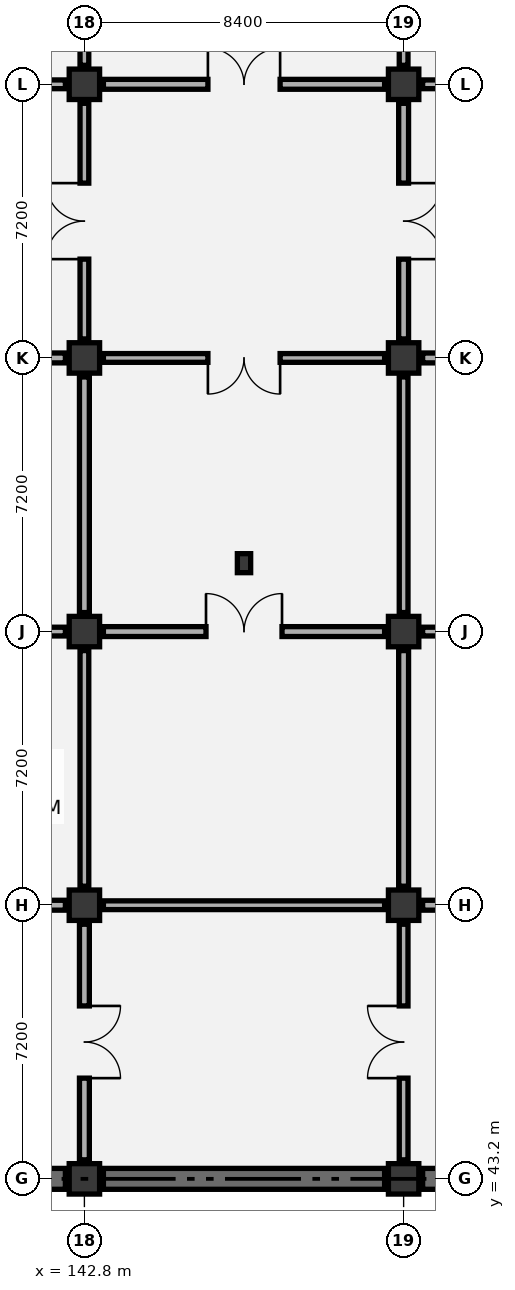
"""IFC4 building model, lengths in metres.
Left out: names, types, materials, properties, quantities, classifications, styles, units other than length and angle.
Written with IfcOpenShell. Run it as: python <this file> out.ifc"""

import sys

from ifc_helpers import new_model, si_unit, direction, frame, frame_2d, origin, origin_2d, place, context, subcontext, project, spatial, rectangle, extrude, element, fill, save


model = new_model("IFC4")
c1 = context("Model", 3, precision=1e-05, world=origin(), true_north=direction((0.0, 1.0)))
c2 = subcontext(c1, "Body", "Model", "MODEL_VIEW")
j1 = project(units=[si_unit("LENGTHUNIT", "METRE"), si_unit("PLANEANGLEUNIT", "RADIAN")], contexts=[c1])
p1 = place(None, origin())
s1 = spatial("IfcSite", under=j1, at=p1, CompositionType="ELEMENT")
p2 = place(p1, origin())
s2 = spatial("IfcBuilding", under=s1, at=p2, CompositionType="ELEMENT")
p3 = place(p2, frame((0.0, 0.0, -9.6)))
s3 = spatial("IfcBuildingStorey", under=s2, at=p3, CompositionType="ELEMENT", Elevation=-9.6)
for number, where, z_axis, x_axis in (
    (1, (142.8, 43.2, 0.0), (0.0, 0.0, 1.0), (1.0, 0.0, 0.0)),
    (2, (142.8, 50.4, 0.0), (0.0, 0.0, 1.0), (1.0, 0.0, 0.0)),
    (3, (142.8, 57.6, 0.0), (0.0, 0.0, 1.0), (1.0, 0.0, 0.0)),
    (4, (142.8, 64.8, 0.0), (0.0, 0.0, 1.0), (1.0, 0.0, 0.0)),
    (5, (142.8, 72.0, 0.0), (0.0, 0.0, 1.0), (1.0, 0.0, 0.0)),
    (6, (151.2, 43.2, 0.0), (0.0, 0.0, 1.0), (1.0, 0.0, 0.0)),
    (7, (151.2, 50.4, 0.0), (0.0, 0.0, 1.0), (1.0, 0.0, 0.0)),
    (8, (151.2, 57.6, 0.0), (0.0, 0.0, 1.0), (1.0, 0.0, 0.0)),
    (9, (151.2, 64.8, 0.0), (0.0, 0.0, 1.0), (1.0, 0.0, 0.0)),
    (10, (151.2, 72.0, 0.0), (0.0, 0.0, 1.0), (1.0, 0.0, 0.0)),
):
    element("IfcColumn", number, at=place(p3, frame(where, z_axis=z_axis, x_axis=x_axis)), inside=s3, PredefinedType="COLUMN", context=c2, shape_type="SweptSolid", body=[
        extrude(rectangle(XDim=0.8, YDim=0.8, at=origin_2d()), origin(), (0.0, 0.0, 1.0), 4.8),
    ])
p4 = place(p3, frame((147.0, 59.4, 0.0), z_axis=(0.0, 0.0, 1.0), x_axis=(1.0, 0.0, 0.0)))
e11 = element("IfcColumn", 11, at=p4, inside=s3, PredefinedType="PILASTER", context=c2, shape_type="SweptSolid", body=[
    extrude(rectangle(XDim=0.35, YDim=0.5, at=origin_2d()), origin(), (0.0, 0.0, 1.0), 4.8),
])
p5 = place(p3, frame((134.9, 43.2, 0.0), z_axis=(0.0, 0.0, 1.0), x_axis=(1.0, 0.0, 0.0)))
e12 = element("IfcWall", 12, at=p5, inside=s3, PredefinedType="USERDEFINED", context=c2, shape_type="SweptSolid", body=[
    extrude(rectangle(XDim=7.4, YDim=0.55, at=frame_2d((3.7, 0.0))), origin(), (0.0, 0.0, 1.0), 4.4),
])
p6 = place(p3, frame((143.3, 43.2, 0.0), z_axis=(0.0, 0.0, 1.0), x_axis=(1.0, 0.0, 0.0)))
e13 = element("IfcWall", 13, at=p6, inside=s3, PredefinedType="USERDEFINED", context=c2, shape_type="SweptSolid", body=[
    extrude(rectangle(XDim=7.4, YDim=0.55, at=frame_2d((3.7, 0.0))), origin(), (0.0, 0.0, 1.0), 4.4),
])
p7 = place(p3, frame((151.7, 43.2, 0.0), z_axis=(0.0, 0.0, 1.0), x_axis=(1.0, 0.0, 0.0)))
e14 = element("IfcWall", 14, at=p7, inside=s3, PredefinedType="USERDEFINED", context=c2, shape_type="SweptSolid", body=[
    extrude(rectangle(XDim=7.4, YDim=0.55, at=frame_2d((3.7, 0.0))), origin(), (0.0, 0.0, 1.0), 4.4),
])
p8 = place(p3, frame((142.8, 43.7, 0.0), z_axis=(0.0, 0.0, 1.0), x_axis=(0.0, 1.0, 0.0)))
e15 = element("IfcWall", 15, at=p8, inside=s3, PredefinedType="PARTITIONING", context=c2, shape_type="SweptSolid", body=[
    extrude(rectangle(XDim=6.2, YDim=0.26, at=frame_2d((3.1, 0.0))), origin(), (0.0, 0.0, 1.0), 3.595),
])
p9 = place(p8, frame((2.15, 0.0, 0.0)))
e16 = element("IfcOpeningElement", 16, at=p9, cuts=e15, PredefinedType="OPENING", context=c2, shape_type="SweptSolid", body=[
    extrude(rectangle(XDim=1.9, YDim=2.3, at=frame_2d((0.95, 1.15))), frame((0.0, 0.14, 0.0), z_axis=(0.0, -1.0, 0.0), x_axis=(1.0, 0.0, 0.0)), (0.0, 0.0, 1.0), 0.28),
])
p10 = place(p3, frame((134.9, 50.4, 0.0), z_axis=(0.0, 0.0, 1.0), x_axis=(1.0, 0.0, 0.0)))
e17 = element("IfcWall", 17, at=p10, inside=s3, PredefinedType="PARTITIONING", context=c2, shape_type="SweptSolid", body=[
    extrude(rectangle(XDim=7.4, YDim=0.26, at=frame_2d((3.7, 0.0))), origin(), (0.0, 0.0, 1.0), 3.495),
])
p11 = place(p3, frame((142.8, 50.9, 0.0), z_axis=(0.0, 0.0, 1.0), x_axis=(0.0, 1.0, 0.0)))
e18 = element("IfcWall", 18, at=p11, inside=s3, PredefinedType="PARTITIONING", context=c2, shape_type="SweptSolid", body=[
    extrude(rectangle(XDim=6.2, YDim=0.23, at=frame_2d((3.1, 0.0))), origin(), (0.0, 0.0, 1.0), 3.595),
])
p12 = place(p3, frame((134.9, 57.6, 0.0), z_axis=(0.0, 0.0, 1.0), x_axis=(1.0, 0.0, 0.0)))
e19 = element("IfcWall", 19, at=p12, inside=s3, PredefinedType="PARTITIONING", context=c2, shape_type="SweptSolid", body=[
    extrude(rectangle(XDim=7.4, YDim=0.23, at=frame_2d((3.7, 0.0))), origin(), (0.0, 0.0, 1.0), 3.495),
])
p13 = place(p12, frame((2.7, 0.0, 0.0)))
e20 = element("IfcOpeningElement", 20, at=p13, cuts=e19, PredefinedType="OPENING", context=c2, shape_type="SweptSolid", body=[
    extrude(rectangle(XDim=2.0, YDim=2.35, at=frame_2d((1.0, 1.175))), frame((0.0, 0.125, 0.0), z_axis=(0.0, -1.0, 0.0), x_axis=(1.0, 0.0, 0.0)), (0.0, 0.0, 1.0), 0.25),
])
p14 = place(p3, frame((142.8, 58.1, 0.0), z_axis=(0.0, 0.0, 1.0), x_axis=(0.0, 1.0, 0.0)))
e21 = element("IfcWall", 21, at=p14, inside=s3, PredefinedType="PARTITIONING", context=c2, shape_type="SweptSolid", body=[
    extrude(rectangle(XDim=6.2, YDim=0.26, at=frame_2d((3.1, 0.0))), origin(), (0.0, 0.0, 1.0), 3.595),
])
p15 = place(p3, frame((134.9, 64.8, 0.0), z_axis=(0.0, 0.0, 1.0), x_axis=(1.0, 0.0, 0.0)))
e22 = element("IfcWall", 22, at=p15, inside=s3, PredefinedType="PARTITIONING", context=c2, shape_type="SweptSolid", body=[
    extrude(rectangle(XDim=7.4, YDim=0.26, at=frame_2d((3.7, 0.0))), origin(), (0.0, 0.0, 1.0), 3.495),
])
p16 = place(p15, frame((2.75, 0.0, 0.0)))
e23 = element("IfcOpeningElement", 23, at=p16, cuts=e22, PredefinedType="OPENING", context=c2, shape_type="SweptSolid", body=[
    extrude(rectangle(XDim=1.9, YDim=2.3, at=frame_2d((0.95, 1.15))), frame((0.0, 0.14, 0.0), z_axis=(0.0, -1.0, 0.0), x_axis=(1.0, 0.0, 0.0)), (0.0, 0.0, 1.0), 0.28),
])
p17 = place(p3, frame((142.8, 65.3, 0.0), z_axis=(0.0, 0.0, 1.0), x_axis=(0.0, 1.0, 0.0)))
e24 = element("IfcWall", 24, at=p17, inside=s3, PredefinedType="PARTITIONING", context=c2, shape_type="SweptSolid", body=[
    extrude(rectangle(XDim=6.2, YDim=0.23, at=frame_2d((3.1, 0.0))), origin(), (0.0, 0.0, 1.0), 3.595),
])
p18 = place(p17, frame((2.1, 0.0, 0.0)))
e25 = element("IfcOpeningElement", 25, at=p18, cuts=e24, PredefinedType="OPENING", context=c2, shape_type="SweptSolid", body=[
    extrude(rectangle(XDim=2.0, YDim=2.35, at=frame_2d((1.0, 1.175))), frame((0.0, 0.125, 0.0), z_axis=(0.0, -1.0, 0.0), x_axis=(1.0, 0.0, 0.0)), (0.0, 0.0, 1.0), 0.25),
])
p19 = place(p3, frame((134.9, 72.0, 0.0), z_axis=(0.0, 0.0, 1.0), x_axis=(1.0, 0.0, 0.0)))
e26 = element("IfcWall", 26, at=p19, inside=s3, PredefinedType="PARTITIONING", context=c2, shape_type="SweptSolid", body=[
    extrude(rectangle(XDim=7.4, YDim=0.23, at=frame_2d((3.7, 0.0))), origin(), (0.0, 0.0, 1.0), 3.495),
])
p20 = place(p19, frame((2.95, 0.0, 0.0)))
e27 = element("IfcOpeningElement", 27, at=p20, cuts=e26, PredefinedType="OPENING", context=c2, shape_type="SweptSolid", body=[
    extrude(rectangle(XDim=1.5, YDim=2.15, at=frame_2d((0.75, 1.075))), frame((0.0, 0.125, 0.0), z_axis=(0.0, -1.0, 0.0), x_axis=(1.0, 0.0, 0.0)), (0.0, 0.0, 1.0), 0.25),
])
p21 = place(p3, frame((142.8, 72.5, 0.0), z_axis=(0.0, 0.0, 1.0), x_axis=(0.0, 1.0, 0.0)))
e28 = element("IfcWall", 28, at=p21, inside=s3, PredefinedType="PARTITIONING", context=c2, shape_type="SweptSolid", body=[
    extrude(rectangle(XDim=6.2, YDim=0.23, at=frame_2d((3.1, 0.0))), origin(), (0.0, 0.0, 1.0), 3.595),
])
p22 = place(p3, frame((151.2, 43.7, 0.0), z_axis=(0.0, 0.0, 1.0), x_axis=(0.0, 1.0, 0.0)))
e29 = element("IfcWall", 29, at=p22, inside=s3, PredefinedType="PARTITIONING", context=c2, shape_type="SweptSolid", body=[
    extrude(rectangle(XDim=6.2, YDim=0.23, at=frame_2d((3.1, 0.0))), origin(), (0.0, 0.0, 1.0), 3.595),
])
p23 = place(p22, frame((2.15, 0.0, 0.0)))
e30 = element("IfcOpeningElement", 30, at=p23, cuts=e29, PredefinedType="OPENING", context=c2, shape_type="SweptSolid", body=[
    extrude(rectangle(XDim=1.9, YDim=2.3, at=frame_2d((0.95, 1.15))), frame((0.0, 0.125, 0.0), z_axis=(0.0, -1.0, 0.0), x_axis=(1.0, 0.0, 0.0)), (0.0, 0.0, 1.0), 0.25),
])
p24 = place(p3, frame((143.3, 50.4, 0.0), z_axis=(0.0, 0.0, 1.0), x_axis=(1.0, 0.0, 0.0)))
e31 = element("IfcWall", 31, at=p24, inside=s3, PredefinedType="PARTITIONING", context=c2, shape_type="SweptSolid", body=[
    extrude(rectangle(XDim=7.4, YDim=0.23, at=frame_2d((3.7, 0.0))), origin(), (0.0, 0.0, 1.0), 3.495),
])
p25 = place(p3, frame((151.2, 50.9, 0.0), z_axis=(0.0, 0.0, 1.0), x_axis=(0.0, 1.0, 0.0)))
e32 = element("IfcWall", 32, at=p25, inside=s3, PredefinedType="PARTITIONING", context=c2, shape_type="SweptSolid", body=[
    extrude(rectangle(XDim=6.2, YDim=0.26, at=frame_2d((3.1, 0.0))), origin(), (0.0, 0.0, 1.0), 3.595),
])
p26 = place(p3, frame((143.3, 57.6, 0.0), z_axis=(0.0, 0.0, 1.0), x_axis=(1.0, 0.0, 0.0)))
e33 = element("IfcWall", 33, at=p26, inside=s3, PredefinedType="PARTITIONING", context=c2, shape_type="SweptSolid", body=[
    extrude(rectangle(XDim=7.4, YDim=0.26, at=frame_2d((3.7, 0.0))), origin(), (0.0, 0.0, 1.0), 3.495),
])
p27 = place(p26, frame((2.7, 0.0, 0.0)))
e34 = element("IfcOpeningElement", 34, at=p27, cuts=e33, PredefinedType="OPENING", context=c2, shape_type="SweptSolid", body=[
    extrude(rectangle(XDim=2.0, YDim=2.35, at=frame_2d((1.0, 1.175))), frame((0.0, 0.14, 0.0), z_axis=(0.0, -1.0, 0.0), x_axis=(1.0, 0.0, 0.0)), (0.0, 0.0, 1.0), 0.28),
])
p28 = place(p3, frame((151.2, 58.1, 0.0), z_axis=(0.0, 0.0, 1.0), x_axis=(0.0, 1.0, 0.0)))
e35 = element("IfcWall", 35, at=p28, inside=s3, PredefinedType="PARTITIONING", context=c2, shape_type="SweptSolid", body=[
    extrude(rectangle(XDim=6.2, YDim=0.23, at=frame_2d((3.1, 0.0))), origin(), (0.0, 0.0, 1.0), 3.595),
])
p29 = place(p3, frame((143.3, 64.8, 0.0), z_axis=(0.0, 0.0, 1.0), x_axis=(1.0, 0.0, 0.0)))
e36 = element("IfcWall", 36, at=p29, inside=s3, PredefinedType="PARTITIONING", context=c2, shape_type="SweptSolid", body=[
    extrude(rectangle(XDim=7.4, YDim=0.23, at=frame_2d((3.7, 0.0))), origin(), (0.0, 0.0, 1.0), 3.495),
])
p30 = place(p29, frame((2.75, 0.0, 0.0)))
e37 = element("IfcOpeningElement", 37, at=p30, cuts=e36, PredefinedType="OPENING", context=c2, shape_type="SweptSolid", body=[
    extrude(rectangle(XDim=1.9, YDim=2.3, at=frame_2d((0.95, 1.15))), frame((0.0, 0.125, 0.0), z_axis=(0.0, -1.0, 0.0), x_axis=(1.0, 0.0, 0.0)), (0.0, 0.0, 1.0), 0.25),
])
p31 = place(p3, frame((151.2, 65.3, 0.0), z_axis=(0.0, 0.0, 1.0), x_axis=(0.0, 1.0, 0.0)))
e38 = element("IfcWall", 38, at=p31, inside=s3, PredefinedType="PARTITIONING", context=c2, shape_type="SweptSolid", body=[
    extrude(rectangle(XDim=6.2, YDim=0.26, at=frame_2d((3.1, 0.0))), origin(), (0.0, 0.0, 1.0), 3.595),
])
p32 = place(p31, frame((2.1, 0.0, 0.0)))
e39 = element("IfcOpeningElement", 39, at=p32, cuts=e38, PredefinedType="OPENING", context=c2, shape_type="SweptSolid", body=[
    extrude(rectangle(XDim=2.0, YDim=2.35, at=frame_2d((1.0, 1.175))), frame((0.0, 0.14, 0.0), z_axis=(0.0, -1.0, 0.0), x_axis=(1.0, 0.0, 0.0)), (0.0, 0.0, 1.0), 0.28),
])
p33 = place(p3, frame((143.3, 72.0, 0.0), z_axis=(0.0, 0.0, 1.0), x_axis=(1.0, 0.0, 0.0)))
e40 = element("IfcWall", 40, at=p33, inside=s3, PredefinedType="PARTITIONING", context=c2, shape_type="SweptSolid", body=[
    extrude(rectangle(XDim=7.4, YDim=0.26, at=frame_2d((3.7, 0.0))), origin(), (0.0, 0.0, 1.0), 3.495),
])
p34 = place(p33, frame((2.75, 0.0, 0.0)))
e41 = element("IfcOpeningElement", 41, at=p34, cuts=e40, PredefinedType="OPENING", context=c2, shape_type="SweptSolid", body=[
    extrude(rectangle(XDim=1.9, YDim=2.3, at=frame_2d((0.95, 1.15))), frame((0.0, 0.14, 0.0), z_axis=(0.0, -1.0, 0.0), x_axis=(1.0, 0.0, 0.0)), (0.0, 0.0, 1.0), 0.28),
])
p35 = place(p3, frame((151.2, 72.5, 0.0), z_axis=(0.0, 0.0, 1.0), x_axis=(0.0, 1.0, 0.0)))
e42 = element("IfcWall", 42, at=p35, inside=s3, PredefinedType="PARTITIONING", context=c2, shape_type="SweptSolid", body=[
    extrude(rectangle(XDim=6.2, YDim=0.23, at=frame_2d((3.1, 0.0))), origin(), (0.0, 0.0, 1.0), 3.595),
])
p36 = place(p3, frame((151.7, 50.4, 0.0), z_axis=(0.0, 0.0, 1.0), x_axis=(1.0, 0.0, 0.0)))
e43 = element("IfcWall", 43, at=p36, inside=s3, PredefinedType="PARTITIONING", context=c2, shape_type="SweptSolid", body=[
    extrude(rectangle(XDim=7.4, YDim=0.26, at=frame_2d((3.7, 0.0))), origin(), (0.0, 0.0, 1.0), 3.495),
])
p37 = place(p3, frame((151.7, 57.6, 0.0), z_axis=(0.0, 0.0, 1.0), x_axis=(1.0, 0.0, 0.0)))
e44 = element("IfcWall", 44, at=p37, inside=s3, PredefinedType="PARTITIONING", context=c2, shape_type="SweptSolid", body=[
    extrude(rectangle(XDim=7.4, YDim=0.23, at=frame_2d((3.7, 0.0))), origin(), (0.0, 0.0, 1.0), 3.495),
])
p38 = place(p37, frame((2.7, 0.0, 0.0)))
e45 = element("IfcOpeningElement", 45, at=p38, cuts=e44, PredefinedType="OPENING", context=c2, shape_type="SweptSolid", body=[
    extrude(rectangle(XDim=2.0, YDim=2.35, at=frame_2d((1.0, 1.175))), frame((0.0, 0.125, 0.0), z_axis=(0.0, -1.0, 0.0), x_axis=(1.0, 0.0, 0.0)), (0.0, 0.0, 1.0), 0.25),
])
p39 = place(p3, frame((151.7, 64.8, 0.0), z_axis=(0.0, 0.0, 1.0), x_axis=(1.0, 0.0, 0.0)))
e46 = element("IfcWall", 46, at=p39, inside=s3, PredefinedType="PARTITIONING", context=c2, shape_type="SweptSolid", body=[
    extrude(rectangle(XDim=7.4, YDim=0.26, at=frame_2d((3.7, 0.0))), origin(), (0.0, 0.0, 1.0), 3.495),
])
p40 = place(p39, frame((2.75, 0.0, 0.0)))
e47 = element("IfcOpeningElement", 47, at=p40, cuts=e46, PredefinedType="OPENING", context=c2, shape_type="SweptSolid", body=[
    extrude(rectangle(XDim=1.9, YDim=2.3, at=frame_2d((0.95, 1.15))), frame((0.0, 0.14, 0.0), z_axis=(0.0, -1.0, 0.0), x_axis=(1.0, 0.0, 0.0)), (0.0, 0.0, 1.0), 0.28),
])
p41 = place(p3, frame((151.7, 72.0, 0.0), z_axis=(0.0, 0.0, 1.0), x_axis=(1.0, 0.0, 0.0)))
e48 = element("IfcWall", 48, at=p41, inside=s3, PredefinedType="PARTITIONING", context=c2, shape_type="SweptSolid", body=[
    extrude(rectangle(XDim=7.4, YDim=0.23, at=frame_2d((3.7, 0.0))), origin(), (0.0, 0.0, 1.0), 3.495),
])
p42 = place(p41, frame((2.75, 0.0, 0.0)))
e49 = element("IfcOpeningElement", 49, at=p42, cuts=e48, PredefinedType="OPENING", context=c2, shape_type="SweptSolid", body=[
    extrude(rectangle(XDim=1.9, YDim=2.3, at=frame_2d((0.95, 1.15))), frame((0.0, 0.125, 0.0), z_axis=(0.0, -1.0, 0.0), x_axis=(1.0, 0.0, 0.0)), (0.0, 0.0, 1.0), 0.25),
])
p43 = place(p9, frame((1.9, 0.0, 0.0), z_axis=(0.0, 0.0, 1.0), x_axis=(-1.0, 0.0, 0.0)))
e50 = element("IfcDoor", 50, at=p43, inside=s3, OperationType="DOUBLE_DOOR_SINGLE_SWING", PredefinedType="DOOR", context=c2, shape_type="SweptSolid", body=[
    extrude(rectangle(XDim=1.9, YDim=2.3, at=frame_2d((0.95, 1.15))), frame((0.0, 0.025, 0.0), z_axis=(0.0, -1.0, 0.0), x_axis=(1.0, 0.0, 0.0)), (0.0, 0.0, 1.0), 0.05),
])
fill(e16, e50)
p44 = place(p18, origin())
e51 = element("IfcDoor", 51, at=p44, inside=s3, OperationType="DOUBLE_DOOR_SINGLE_SWING", PredefinedType="DOOR", context=c2, shape_type="SweptSolid", body=[
    extrude(rectangle(XDim=2.0, YDim=2.35, at=frame_2d((1.0, 1.175))), frame((0.0, 0.025, 0.0), z_axis=(0.0, -1.0, 0.0), x_axis=(1.0, 0.0, 0.0)), (0.0, 0.0, 1.0), 0.05),
])
fill(e25, e51)
p45 = place(p23, origin())
e52 = element("IfcDoor", 52, at=p45, inside=s3, OperationType="DOUBLE_DOOR_SINGLE_SWING", PredefinedType="DOOR", context=c2, shape_type="SweptSolid", body=[
    extrude(rectangle(XDim=1.9, YDim=2.3, at=frame_2d((0.95, 1.15))), frame((0.0, 0.025, 0.0), z_axis=(0.0, -1.0, 0.0), x_axis=(1.0, 0.0, 0.0)), (0.0, 0.0, 1.0), 0.05),
])
fill(e30, e52)
p46 = place(p27, origin())
e53 = element("IfcDoor", 53, at=p46, inside=s3, OperationType="DOUBLE_DOOR_SINGLE_SWING", PredefinedType="DOOR", context=c2, shape_type="SweptSolid", body=[
    extrude(rectangle(XDim=2.0, YDim=2.35, at=frame_2d((1.0, 1.175))), frame((0.0, 0.025, 0.0), z_axis=(0.0, -1.0, 0.0), x_axis=(1.0, 0.0, 0.0)), (0.0, 0.0, 1.0), 0.05),
])
fill(e34, e53)
p47 = place(p30, frame((1.9, 0.0, 0.0), z_axis=(0.0, 0.0, 1.0), x_axis=(-1.0, 0.0, 0.0)))
e54 = element("IfcDoor", 54, at=p47, inside=s3, OperationType="DOUBLE_DOOR_SINGLE_SWING", PredefinedType="DOOR", context=c2, shape_type="SweptSolid", body=[
    extrude(rectangle(XDim=1.9, YDim=2.3, at=frame_2d((0.95, 1.15))), frame((0.0, 0.025, 0.0), z_axis=(0.0, -1.0, 0.0), x_axis=(1.0, 0.0, 0.0)), (0.0, 0.0, 1.0), 0.05),
])
fill(e37, e54)
p48 = place(p32, frame((2.0, 0.0, 0.0), z_axis=(0.0, 0.0, 1.0), x_axis=(-1.0, 0.0, 0.0)))
e55 = element("IfcDoor", 55, at=p48, inside=s3, OperationType="DOUBLE_DOOR_SINGLE_SWING", PredefinedType="DOOR", context=c2, shape_type="SweptSolid", body=[
    extrude(rectangle(XDim=2.0, YDim=2.35, at=frame_2d((1.0, 1.175))), frame((0.0, 0.025, 0.0), z_axis=(0.0, -1.0, 0.0), x_axis=(1.0, 0.0, 0.0)), (0.0, 0.0, 1.0), 0.05),
])
fill(e39, e55)
p49 = place(p34, origin())
e56 = element("IfcDoor", 56, at=p49, inside=s3, OperationType="DOUBLE_DOOR_SINGLE_SWING", PredefinedType="DOOR", context=c2, shape_type="SweptSolid", body=[
    extrude(rectangle(XDim=1.9, YDim=2.3, at=frame_2d((0.95, 1.15))), frame((0.0, 0.025, 0.0), z_axis=(0.0, -1.0, 0.0), x_axis=(1.0, 0.0, 0.0)), (0.0, 0.0, 1.0), 0.05),
])
fill(e41, e56)
save(model, sys.argv[1])
